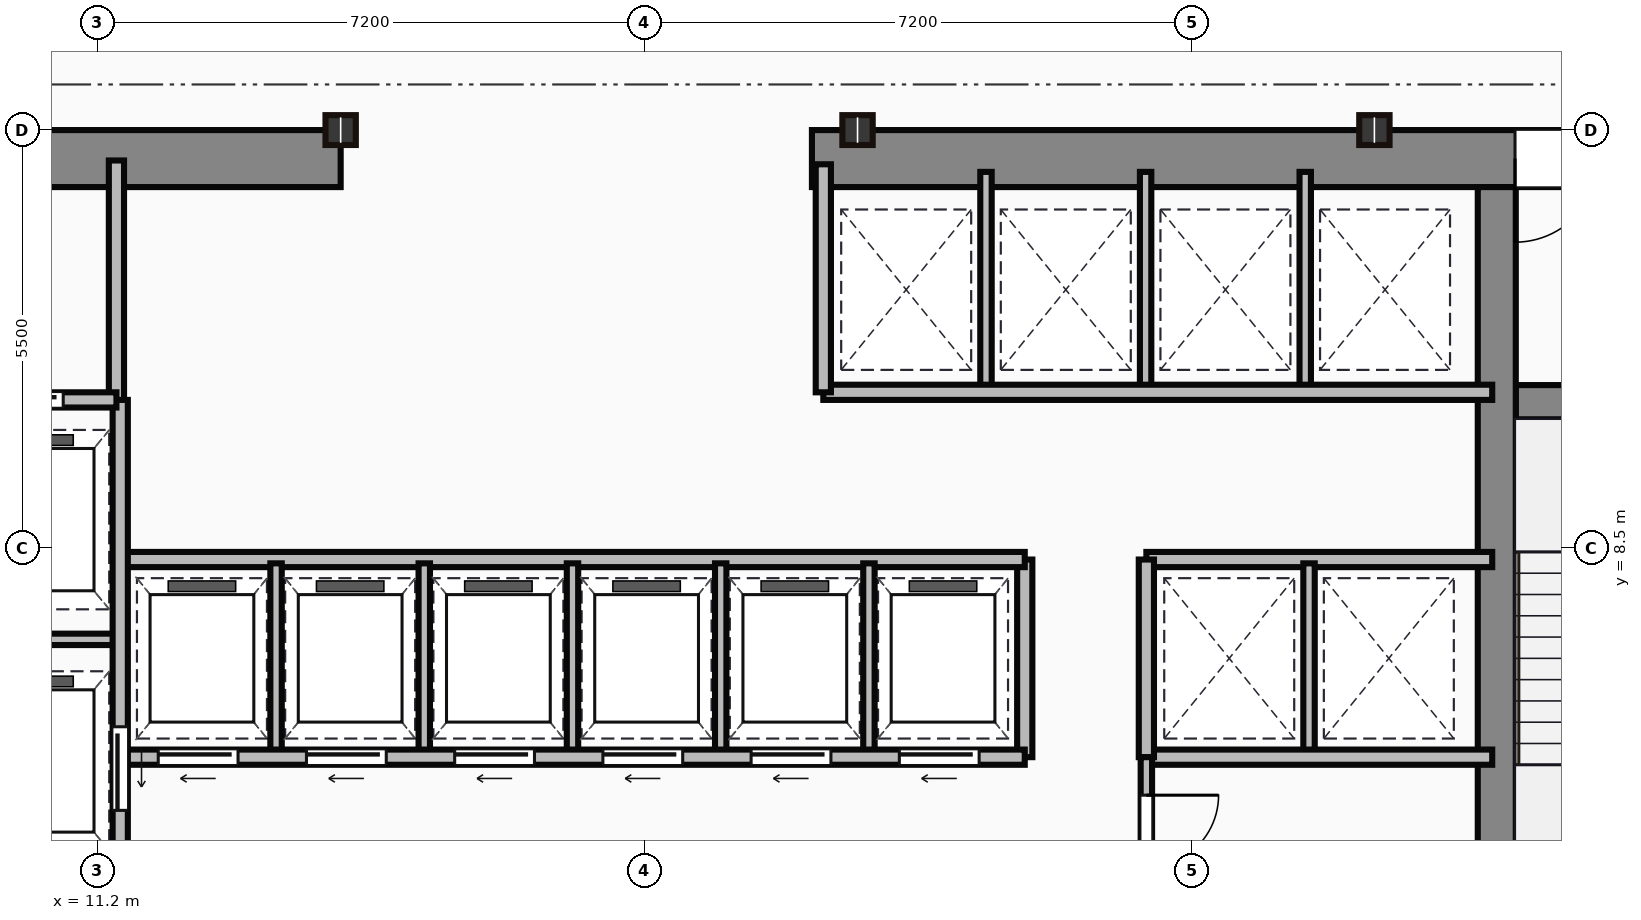
"""IFC4 building model, lengths in metres.
Left out: names, types, materials, properties, quantities, classifications, styles, units other than length and angle.
Written with IfcOpenShell. Run it as: python <this file> out.ifc"""

import sys

from ifc_helpers import new_model, si_unit, direction, frame, frame_2d, origin, origin_2d, place, context, subcontext, project, spatial, rectangle, i_section, extrude, source, transform, mapped, element, fill, save


model = new_model("IFC4")
c1 = context("Model", 3, precision=1e-05, world=origin(), true_north=direction((0.0, 1.0)))
c2 = subcontext(c1, "Body", "Model", "MODEL_VIEW")
j1 = project(units=[si_unit("LENGTHUNIT", "METRE"), si_unit("PLANEANGLEUNIT", "RADIAN")], contexts=[c1])
p1 = place(None, origin())
s1 = spatial("IfcSite", under=j1, at=p1, CompositionType="ELEMENT")
p2 = place(p1, origin())
s2 = spatial("IfcBuilding", under=s1, at=p2, CompositionType="ELEMENT")
p3 = place(p2, frame((0.0, 0.0, 95.95)))
s3 = spatial("IfcBuildingStorey", under=s2, at=p3, CompositionType="ELEMENT", Elevation=95.95)
m1 = source(origin(), c2, "Body", "SweptSolid", [
    extrude(rectangle(XDim=9.1, YDim=0.75, at=frame_2d((4.55, 0.0))), origin(), (0.0, 0.0, 1.0), 3.65),
])
p4 = place(p3, frame((5.3, 13.625, 0.0), z_axis=(0.0, 0.0, 1.0), x_axis=(1.0, 0.0, 0.0)))
e1 = element("IfcWall", 1, at=p4, inside=s3, PredefinedType="SHEAR", context=c2, shape_type="MappedRepresentation", body=[
    mapped(m1, transform((0.0, 0.0, 0.0))),
])
p5 = place(p4, frame((4.1, 0.0, 0.0)))
e2 = element("IfcOpeningElement", 2, at=p5, cuts=e1, PredefinedType="OPENING", context=c2, shape_type="SweptSolid", body=[
    extrude(rectangle(XDim=1.1, YDim=2.15, at=frame_2d((0.55, 1.075))), frame((0.0, 0.385, 0.0), z_axis=(0.0, -1.0, 0.0), x_axis=(1.0, 0.0, 0.0)), (0.0, 0.0, 1.0), 0.77),
])
m2 = source(origin(), c2, "Body", "SweptSolid", [
    extrude(rectangle(XDim=12.6, YDim=0.75, at=frame_2d((6.3, 0.0))), origin(), (0.0, 0.0, 1.0), 3.65),
])
p6 = place(p3, frame((20.6, 13.625, 0.0), z_axis=(0.0, 0.0, 1.0), x_axis=(1.0, 0.0, 0.0)))
e3 = element("IfcWall", 3, at=p6, inside=s3, PredefinedType="SHEAR", context=c2, shape_type="MappedRepresentation", body=[
    mapped(m2, transform((0.0, 0.0, 0.0))),
])
p7 = place(p6, frame((9.25, 0.0, 0.0)))
e4 = element("IfcOpeningElement", 4, at=p7, cuts=e3, PredefinedType="OPENING", context=c2, shape_type="SweptSolid", body=[
    extrude(rectangle(XDim=1.1, YDim=2.15, at=frame_2d((0.55, 1.075))), frame((0.0, 0.385, 0.0), z_axis=(0.0, -1.0, 0.0), x_axis=(1.0, 0.0, 0.0)), (0.0, 0.0, 1.0), 0.77),
])
m3 = source(origin(), c2, "Body", "SweptSolid", [
    extrude(rectangle(XDim=12.35, YDim=0.5, at=frame_2d((6.175, 0.0))), origin(), (0.0, 0.0, 1.0), 3.65),
])
p8 = place(p3, frame((29.61, 0.9, 0.0), z_axis=(0.0, 0.0, 1.0), x_axis=(0.0, 1.0, 0.0)))
e5 = element("IfcWall", 5, at=p8, inside=s3, PredefinedType="SHEAR", context=c2, shape_type="MappedRepresentation", body=[
    mapped(m3, transform((0.0, 0.0, 0.0))),
])
m4 = source(origin(), c2, "Body", "SweptSolid", [
    extrude(rectangle(XDim=3.39, YDim=0.45, at=frame_2d((1.695, 0.0))), origin(), (0.0, 0.0, 1.0), 3.65),
])
p9 = place(p3, frame((29.86, 10.42, 0.0), z_axis=(0.0, 0.0, 1.0), x_axis=(1.0, 0.0, 0.0)))
e6 = element("IfcWall", 6, at=p9, inside=s3, PredefinedType="SHEAR", context=c2, shape_type="MappedRepresentation", body=[
    mapped(m4, transform((0.0, 0.0, 0.0))),
])
p10 = place(p9, frame((1.1, 0.0, 0.0)))
e7 = element("IfcOpeningElement", 7, at=p10, cuts=e6, PredefinedType="OPENING", context=c2, shape_type="SweptSolid", body=[
    extrude(rectangle(XDim=1.1, YDim=2.15, at=frame_2d((0.55, 1.075))), frame((0.0, 0.235, 0.0), z_axis=(0.0, -1.0, 0.0), x_axis=(1.0, 0.0, 0.0)), (0.0, 0.0, 1.0), 0.47),
])
m5 = source(origin(), c2, "Body", "SweptSolid", [
    extrude(i_section(OverallWidth=0.399, OverallDepth=0.393, WebThickness=0.023, FlangeThickness=0.037, at=origin_2d()), origin(), (0.0, 0.0, 1.0), 3.65),
])
for number, where, z_axis, x_axis in (
    (8, (14.4, 14.0, 0.0), (0.0, 0.0, 1.0), (1.0, 0.0, 0.0)),
    (9, (21.2, 14.0, 0.0), (0.0, 0.0, 1.0), (1.0, 0.0, 0.0)),
    (10, (28.0, 14.0, 0.0), (0.0, 0.0, 1.0), (1.0, 0.0, 0.0)),
):
    element("IfcColumn", number, at=place(p3, frame(where, z_axis=z_axis, x_axis=x_axis)), inside=s3, PredefinedType="COLUMN", context=c2, shape_type="MappedRepresentation", body=[
        mapped(m5, transform((0.0, 0.0, 0.0))),
    ])
m6 = source(origin(), c2, "Body", "SweptSolid", [
    extrude(rectangle(XDim=3.18, YDim=0.2, at=frame_2d((1.59, 0.0))), origin(), (0.0, 0.0, 1.0), 3.4),
])
p11 = place(p3, frame((11.45, 10.42, 0.0), z_axis=(0.0, 0.0, 1.0), x_axis=(0.0, 1.0, 0.0)))
e11 = element("IfcWall", 11, at=p11, inside=s3, PredefinedType="PARTITIONING", context=c2, shape_type="MappedRepresentation", body=[
    mapped(m6, transform((0.0, 0.0, 0.0))),
])
m7 = source(origin(), c2, "Body", "SweptSolid", [
    extrude(rectangle(XDim=2.35, YDim=0.2, at=frame_2d((1.175, 0.0))), origin(), (0.0, 0.0, 1.0), 3.4),
])
p12 = place(p3, frame((9.1, 10.45, 0.0), z_axis=(0.0, 0.0, 1.0), x_axis=(1.0, 0.0, 0.0)))
e12 = element("IfcWall", 12, at=p12, inside=s3, PredefinedType="PARTITIONING", context=c2, shape_type="MappedRepresentation", body=[
    mapped(m7, transform((0.0, 0.0, 0.0))),
])
p13 = place(p12, frame((0.55, 0.0, 0.0)))
e13 = element("IfcOpeningElement", 13, at=p13, cuts=e12, PredefinedType="OPENING", context=c2, shape_type="SweptSolid", body=[
    extrude(rectangle(XDim=1.1, YDim=2.15, at=frame_2d((0.55, 1.075))), frame((0.0, 0.11, 0.0), z_axis=(0.0, -1.0, 0.0), x_axis=(1.0, 0.0, 0.0)), (0.0, 0.0, 1.0), 0.22),
])
m8 = source(origin(), c2, "Body", "SweptSolid", [
    extrude(rectangle(XDim=9.6, YDim=0.2, at=frame_2d((4.8, 0.0))), origin(), (0.0, 0.0, 1.0), 3.4),
])
p14 = place(p3, frame((11.5, 0.85, 0.0), z_axis=(0.0, 0.0, 1.0), x_axis=(0.0, 1.0, 0.0)))
e14 = element("IfcWall", 14, at=p14, inside=s3, PredefinedType="PARTITIONING", context=c2, shape_type="MappedRepresentation", body=[
    mapped(m8, transform((0.0, 0.0, 0.0))),
])
p15 = place(p14, frame((4.2, 0.0, 0.0)))
e15 = element("IfcOpeningElement", 15, at=p15, cuts=e14, PredefinedType="OPENING", context=c2, shape_type="SweptSolid", body=[
    extrude(rectangle(XDim=1.1, YDim=2.15, at=frame_2d((0.55, 1.075))), frame((0.0, 0.11, 0.0), z_axis=(0.0, -1.0, 0.0), x_axis=(1.0, 0.0, 0.0)), (0.0, 0.0, 1.0), 0.22),
])
p16 = place(p14, frame((0.9, 0.0, 0.0)))
e16 = element("IfcOpeningElement", 16, at=p16, cuts=e14, PredefinedType="OPENING", context=c2, shape_type="SweptSolid", body=[
    extrude(rectangle(XDim=1.2, YDim=2.15, at=frame_2d((0.6, 1.075))), frame((0.0, 0.11, 0.0), z_axis=(0.0, -1.0, 0.0), x_axis=(1.0, 0.0, 0.0)), (0.0, 0.0, 1.0), 0.22),
])
m9 = source(origin(), c2, "Body", "SweptSolid", [
    extrude(rectangle(XDim=2.4, YDim=0.15, at=frame_2d((1.2, 0.0))), origin(), (0.0, 0.0, 1.0), 3.4),
])
p17 = place(p3, frame((9.1, 7.3, 0.0), z_axis=(0.0, 0.0, 1.0), x_axis=(1.0, 0.0, 0.0)))
e17 = element("IfcWall", 17, at=p17, inside=s3, PredefinedType="PARTITIONING", context=c2, shape_type="MappedRepresentation", body=[
    mapped(m9, transform((0.0, 0.0, 0.0))),
])
m10 = source(origin(), c2, "Body", "SweptSolid", [
    extrude(rectangle(XDim=11.85, YDim=0.2, at=frame_2d((5.925, 0.0))), origin(), (0.0, 0.0, 1.0), 3.4),
])
p18 = place(p3, frame((11.55, 5.75, 0.0), z_axis=(0.0, 0.0, 1.0), x_axis=(1.0, 0.0, 0.0)))
e18 = element("IfcWall", 18, at=p18, inside=s3, PredefinedType="PARTITIONING", context=c2, shape_type="MappedRepresentation", body=[
    mapped(m10, transform((0.0, 0.0, 0.0))),
])
p19 = place(p18, frame((0.45, 0.0, 0.0)))
e19 = element("IfcOpeningElement", 19, at=p19, cuts=e18, PredefinedType="OPENING", context=c2, shape_type="SweptSolid", body=[
    extrude(rectangle(XDim=1.05, YDim=2.15, at=frame_2d((0.525, 1.075))), frame((0.0, 0.11, 0.0), z_axis=(0.0, -1.0, 0.0), x_axis=(1.0, 0.0, 0.0)), (0.0, 0.0, 1.0), 0.22),
])
p20 = place(p18, frame((2.4, 0.0, 0.0)))
e20 = element("IfcOpeningElement", 20, at=p20, cuts=e18, PredefinedType="OPENING", context=c2, shape_type="SweptSolid", body=[
    extrude(rectangle(XDim=1.05, YDim=2.15, at=frame_2d((0.525, 1.075))), frame((0.0, 0.11, 0.0), z_axis=(0.0, -1.0, 0.0), x_axis=(1.0, 0.0, 0.0)), (0.0, 0.0, 1.0), 0.22),
])
p21 = place(p18, frame((4.35, 0.0, 0.0)))
e21 = element("IfcOpeningElement", 21, at=p21, cuts=e18, PredefinedType="OPENING", context=c2, shape_type="SweptSolid", body=[
    extrude(rectangle(XDim=1.05, YDim=2.15, at=frame_2d((0.525, 1.075))), frame((0.0, 0.11, 0.0), z_axis=(0.0, -1.0, 0.0), x_axis=(1.0, 0.0, 0.0)), (0.0, 0.0, 1.0), 0.22),
])
p22 = place(p18, frame((6.3, 0.0, 0.0)))
e22 = element("IfcOpeningElement", 22, at=p22, cuts=e18, PredefinedType="OPENING", context=c2, shape_type="SweptSolid", body=[
    extrude(rectangle(XDim=1.05, YDim=2.15, at=frame_2d((0.525, 1.075))), frame((0.0, 0.11, 0.0), z_axis=(0.0, -1.0, 0.0), x_axis=(1.0, 0.0, 0.0)), (0.0, 0.0, 1.0), 0.22),
])
p23 = place(p18, frame((8.25, 0.0, 0.0)))
e23 = element("IfcOpeningElement", 23, at=p23, cuts=e18, PredefinedType="OPENING", context=c2, shape_type="SweptSolid", body=[
    extrude(rectangle(XDim=1.05, YDim=2.15, at=frame_2d((0.525, 1.075))), frame((0.0, 0.11, 0.0), z_axis=(0.0, -1.0, 0.0), x_axis=(1.0, 0.0, 0.0)), (0.0, 0.0, 1.0), 0.22),
])
p24 = place(p18, frame((10.2, 0.0, 0.0)))
e24 = element("IfcOpeningElement", 24, at=p24, cuts=e18, PredefinedType="OPENING", context=c2, shape_type="SweptSolid", body=[
    extrude(rectangle(XDim=1.05, YDim=2.15, at=frame_2d((0.525, 1.075))), frame((0.0, 0.11, 0.0), z_axis=(0.0, -1.0, 0.0), x_axis=(1.0, 0.0, 0.0)), (0.0, 0.0, 1.0), 0.22),
])
p25 = place(p3, frame((11.55, 8.35, 0.0), z_axis=(0.0, 0.0, 1.0), x_axis=(1.0, 0.0, 0.0)))
e25 = element("IfcWall", 25, at=p25, inside=s3, PredefinedType="PARTITIONING", context=c2, shape_type="MappedRepresentation", body=[
    mapped(m10, transform((0.0, 0.0, 0.0))),
])
m11 = source(origin(), c2, "Body", "SweptSolid", [
    extrude(rectangle(XDim=2.6, YDim=0.2, at=frame_2d((1.3, 0.0))), origin(), (0.0, 0.0, 1.0), 3.4),
])
p26 = place(p3, frame((23.4, 5.75, 0.0), z_axis=(0.0, 0.0, 1.0), x_axis=(0.0, 1.0, 0.0)))
e26 = element("IfcWall", 26, at=p26, inside=s3, PredefinedType="PARTITIONING", context=c2, shape_type="MappedRepresentation", body=[
    mapped(m11, transform((0.0, 0.0, 0.0))),
])
m12 = source(origin(), c2, "Body", "SweptSolid", [
    extrude(rectangle(XDim=2.5, YDim=0.15, at=frame_2d((1.25, 0.0))), origin(), (0.0, 0.0, 1.0), 3.4),
])
for number, where, z_axis, x_axis in (
    (27, (13.55, 5.8, 0.0), (0.0, 0.0, 1.0), (0.0, 1.0, 0.0)),
    (28, (15.5, 5.8, 0.0), (0.0, 0.0, 1.0), (0.0, 1.0, 0.0)),
    (29, (17.45, 5.8, 0.0), (0.0, 0.0, 1.0), (0.0, 1.0, 0.0)),
    (30, (19.4, 5.8, 0.0), (0.0, 0.0, 1.0), (0.0, 1.0, 0.0)),
    (31, (21.35, 5.8, 0.0), (0.0, 0.0, 1.0), (0.0, 1.0, 0.0)),
):
    element("IfcWall", number, at=place(p3, frame(where, z_axis=z_axis, x_axis=x_axis)), inside=s3, PredefinedType="PARTITIONING", context=c2, shape_type="MappedRepresentation", body=[
        mapped(m12, transform((0.0, 0.0, 0.0))),
    ])
m13 = source(origin(), c2, "Body", "SweptSolid", [
    extrude(rectangle(XDim=8.8, YDim=0.2, at=frame_2d((4.4, 0.0))), origin(), (0.0, 0.0, 1.0), 3.4),
])
p27 = place(p3, frame((20.75, 10.55, 0.0), z_axis=(0.0, 0.0, 1.0), x_axis=(1.0, 0.0, 0.0)))
e32 = element("IfcWall", 32, at=p27, inside=s3, PredefinedType="PARTITIONING", context=c2, shape_type="MappedRepresentation", body=[
    mapped(m13, transform((0.0, 0.0, 0.0))),
])
m14 = source(origin(), c2, "Body", "SweptSolid", [
    extrude(rectangle(XDim=3.0, YDim=0.2, at=frame_2d((1.5, 0.0))), origin(), (0.0, 0.0, 1.0), 3.4),
])
p28 = place(p3, frame((20.75, 10.55, 0.0), z_axis=(0.0, 0.0, 1.0), x_axis=(0.0, 1.0, 0.0)))
e33 = element("IfcWall", 33, at=p28, inside=s3, PredefinedType="PARTITIONING", context=c2, shape_type="MappedRepresentation", body=[
    mapped(m14, transform((0.0, 0.0, 0.0))),
])
m15 = source(origin(), c2, "Body", "SweptSolid", [
    extrude(rectangle(XDim=2.85, YDim=0.15, at=frame_2d((1.425, 0.0))), origin(), (0.0, 0.0, 1.0), 3.4),
])
for number, where, z_axis, x_axis in (
    (34, (22.89, 10.6, 0.0), (0.0, 0.0, 1.0), (0.0, 1.0, 0.0)),
    (35, (24.99, 10.6, 0.0), (0.0, 0.0, 1.0), (0.0, 1.0, 0.0)),
    (36, (27.09, 10.6, 0.0), (0.0, 0.0, 1.0), (0.0, 1.0, 0.0)),
):
    element("IfcWall", number, at=place(p3, frame(where, z_axis=z_axis, x_axis=x_axis)), inside=s3, PredefinedType="PARTITIONING", context=c2, shape_type="MappedRepresentation", body=[
        mapped(m15, transform((0.0, 0.0, 0.0))),
    ])
m16 = source(origin(), c2, "Body", "SweptSolid", [
    extrude(rectangle(XDim=4.55, YDim=0.2, at=frame_2d((2.275, 0.0))), origin(), (0.0, 0.0, 1.0), 3.4),
])
for number, where, z_axis, x_axis in (
    (37, (25.0, 8.35, 0.0), (0.0, 0.0, 1.0), (1.0, 0.0, 0.0)),
    (38, (25.0, 5.75, 0.0), (0.0, 0.0, 1.0), (1.0, 0.0, 0.0)),
):
    element("IfcWall", number, at=place(p3, frame(where, z_axis=z_axis, x_axis=x_axis)), inside=s3, PredefinedType="PARTITIONING", context=c2, shape_type="MappedRepresentation", body=[
        mapped(m16, transform((0.0, 0.0, 0.0))),
    ])
p29 = place(p3, frame((25.0, 5.75, 0.0), z_axis=(0.0, 0.0, 1.0), x_axis=(0.0, 1.0, 0.0)))
e39 = element("IfcWall", 39, at=p29, inside=s3, PredefinedType="PARTITIONING", context=c2, shape_type="MappedRepresentation", body=[
    mapped(m11, transform((0.0, 0.0, 0.0))),
])
p30 = place(p3, frame((27.14, 5.8, 0.0), z_axis=(0.0, 0.0, 1.0), x_axis=(0.0, 1.0, 0.0)))
e40 = element("IfcWall", 40, at=p30, inside=s3, PredefinedType="PARTITIONING", context=c2, shape_type="MappedRepresentation", body=[
    mapped(m12, transform((0.0, 0.0, 0.0))),
])
m17 = source(origin(), c2, "Body", "SweptSolid", [
    extrude(rectangle(XDim=4.9, YDim=0.15, at=frame_2d((2.45, 0.0))), origin(), (0.0, 0.0, 1.0), 3.4),
])
p31 = place(p3, frame((25.0, 0.85, 0.0), z_axis=(0.0, 0.0, 1.0), x_axis=(0.0, 1.0, 0.0)))
e41 = element("IfcWall", 41, at=p31, inside=s3, PredefinedType="PARTITIONING", context=c2, shape_type="MappedRepresentation", body=[
    mapped(m17, transform((0.0, 0.0, 0.0))),
])
p32 = place(p31, frame((1.8, 0.0, 0.0)))
e42 = element("IfcOpeningElement", 42, at=p32, cuts=e41, PredefinedType="OPENING", context=c2, shape_type="SweptSolid", body=[
    extrude(rectangle(XDim=0.95, YDim=2.15, at=frame_2d((0.475, 1.075))), frame((0.0, 0.085, 0.0), z_axis=(0.0, -1.0, 0.0), x_axis=(1.0, 0.0, 0.0)), (0.0, 0.0, 1.0), 0.17),
])
p33 = place(p31, frame((3.45, 0.0, 0.0)))
e43 = element("IfcOpeningElement", 43, at=p33, cuts=e41, PredefinedType="OPENING", context=c2, shape_type="SweptSolid", body=[
    extrude(rectangle(XDim=0.95, YDim=2.15, at=frame_2d((0.475, 1.075))), frame((0.0, 0.085, 0.0), z_axis=(0.0, -1.0, 0.0), x_axis=(1.0, 0.0, 0.0)), (0.0, 0.0, 1.0), 0.17),
])
m18 = source(origin(), c2, "Body", "SweptSolid", [
    extrude(rectangle(XDim=1.1, YDim=2.15, at=frame_2d((0.55, 1.075))), frame((0.0, 0.025, 0.0), z_axis=(0.0, -1.0, 0.0), x_axis=(1.0, 0.0, 0.0)), (0.0, 0.0, 1.0), 0.05),
])
p34 = place(p7, origin())
e44 = element("IfcDoor", 44, at=p34, inside=s3, OperationType="SINGLE_SWING_LEFT", PredefinedType="DOOR", context=c2, shape_type="MappedRepresentation", body=[
    mapped(m18, transform((0.0, 0.0, 0.0))),
])
fill(e4, e44)
p35 = place(p13, origin())
e45 = element("IfcDoor", 45, at=p35, inside=s3, OperationType="SLIDING_TO_LEFT", PredefinedType="DOOR", context=c2, shape_type="MappedRepresentation", body=[
    mapped(m18, transform((0.0, 0.0, 0.0))),
])
fill(e13, e45)
p36 = place(p15, frame((1.1, 0.0, 0.0), z_axis=(0.0, 0.0, 1.0), x_axis=(-1.0, 0.0, 0.0)))
e46 = element("IfcDoor", 46, at=p36, inside=s3, OperationType="SLIDING_TO_LEFT", PredefinedType="DOOR", context=c2, shape_type="MappedRepresentation", body=[
    mapped(m18, transform((0.0, 0.0, 0.0))),
])
fill(e15, e46)
m19 = source(origin(), c2, "Body", "SweptSolid", [
    extrude(rectangle(XDim=1.05, YDim=2.15, at=frame_2d((0.525, 1.075))), frame((0.0, 0.025, 0.0), z_axis=(0.0, -1.0, 0.0), x_axis=(1.0, 0.0, 0.0)), (0.0, 0.0, 1.0), 0.05),
])
p37 = place(p19, frame((1.05, 0.0, 0.0), z_axis=(0.0, 0.0, 1.0), x_axis=(-1.0, 0.0, 0.0)))
e47 = element("IfcDoor", 47, at=p37, inside=s3, OperationType="SLIDING_TO_LEFT", PredefinedType="DOOR", context=c2, shape_type="MappedRepresentation", body=[
    mapped(m19, transform((0.0, 0.0, 0.0))),
])
fill(e19, e47)
p38 = place(p20, frame((1.05, 0.0, 0.0), z_axis=(0.0, 0.0, 1.0), x_axis=(-1.0, 0.0, 0.0)))
e48 = element("IfcDoor", 48, at=p38, inside=s3, OperationType="SLIDING_TO_LEFT", PredefinedType="DOOR", context=c2, shape_type="MappedRepresentation", body=[
    mapped(m19, transform((0.0, 0.0, 0.0))),
])
fill(e20, e48)
p39 = place(p21, frame((1.05, 0.0, 0.0), z_axis=(0.0, 0.0, 1.0), x_axis=(-1.0, 0.0, 0.0)))
e49 = element("IfcDoor", 49, at=p39, inside=s3, OperationType="SLIDING_TO_LEFT", PredefinedType="DOOR", context=c2, shape_type="MappedRepresentation", body=[
    mapped(m19, transform((0.0, 0.0, 0.0))),
])
fill(e21, e49)
p40 = place(p22, frame((1.05, 0.0, 0.0), z_axis=(0.0, 0.0, 1.0), x_axis=(-1.0, 0.0, 0.0)))
e50 = element("IfcDoor", 50, at=p40, inside=s3, OperationType="SLIDING_TO_LEFT", PredefinedType="DOOR", context=c2, shape_type="MappedRepresentation", body=[
    mapped(m19, transform((0.0, 0.0, 0.0))),
])
fill(e22, e50)
p41 = place(p23, frame((1.05, 0.0, 0.0), z_axis=(0.0, 0.0, 1.0), x_axis=(-1.0, 0.0, 0.0)))
e51 = element("IfcDoor", 51, at=p41, inside=s3, OperationType="SLIDING_TO_LEFT", PredefinedType="DOOR", context=c2, shape_type="MappedRepresentation", body=[
    mapped(m19, transform((0.0, 0.0, 0.0))),
])
fill(e23, e51)
p42 = place(p24, frame((1.05, 0.0, 0.0), z_axis=(0.0, 0.0, 1.0), x_axis=(-1.0, 0.0, 0.0)))
e52 = element("IfcDoor", 52, at=p42, inside=s3, OperationType="SLIDING_TO_LEFT", PredefinedType="DOOR", context=c2, shape_type="MappedRepresentation", body=[
    mapped(m19, transform((0.0, 0.0, 0.0))),
])
fill(e24, e52)
m20 = source(origin(), c2, "Body", "SweptSolid", [
    extrude(rectangle(XDim=0.95, YDim=2.15, at=frame_2d((0.475, 1.075))), frame((0.0, 0.025, 0.0), z_axis=(0.0, -1.0, 0.0), x_axis=(1.0, 0.0, 0.0)), (0.0, 0.0, 1.0), 0.05),
])
p43 = place(p33, origin())
e53 = element("IfcDoor", 53, at=p43, inside=s3, OperationType="SINGLE_SWING_RIGHT", PredefinedType="DOOR", context=c2, shape_type="MappedRepresentation", body=[
    mapped(m20, transform((0.0, 0.0, 0.0))),
])
fill(e43, e53)
save(model, sys.argv[1])
